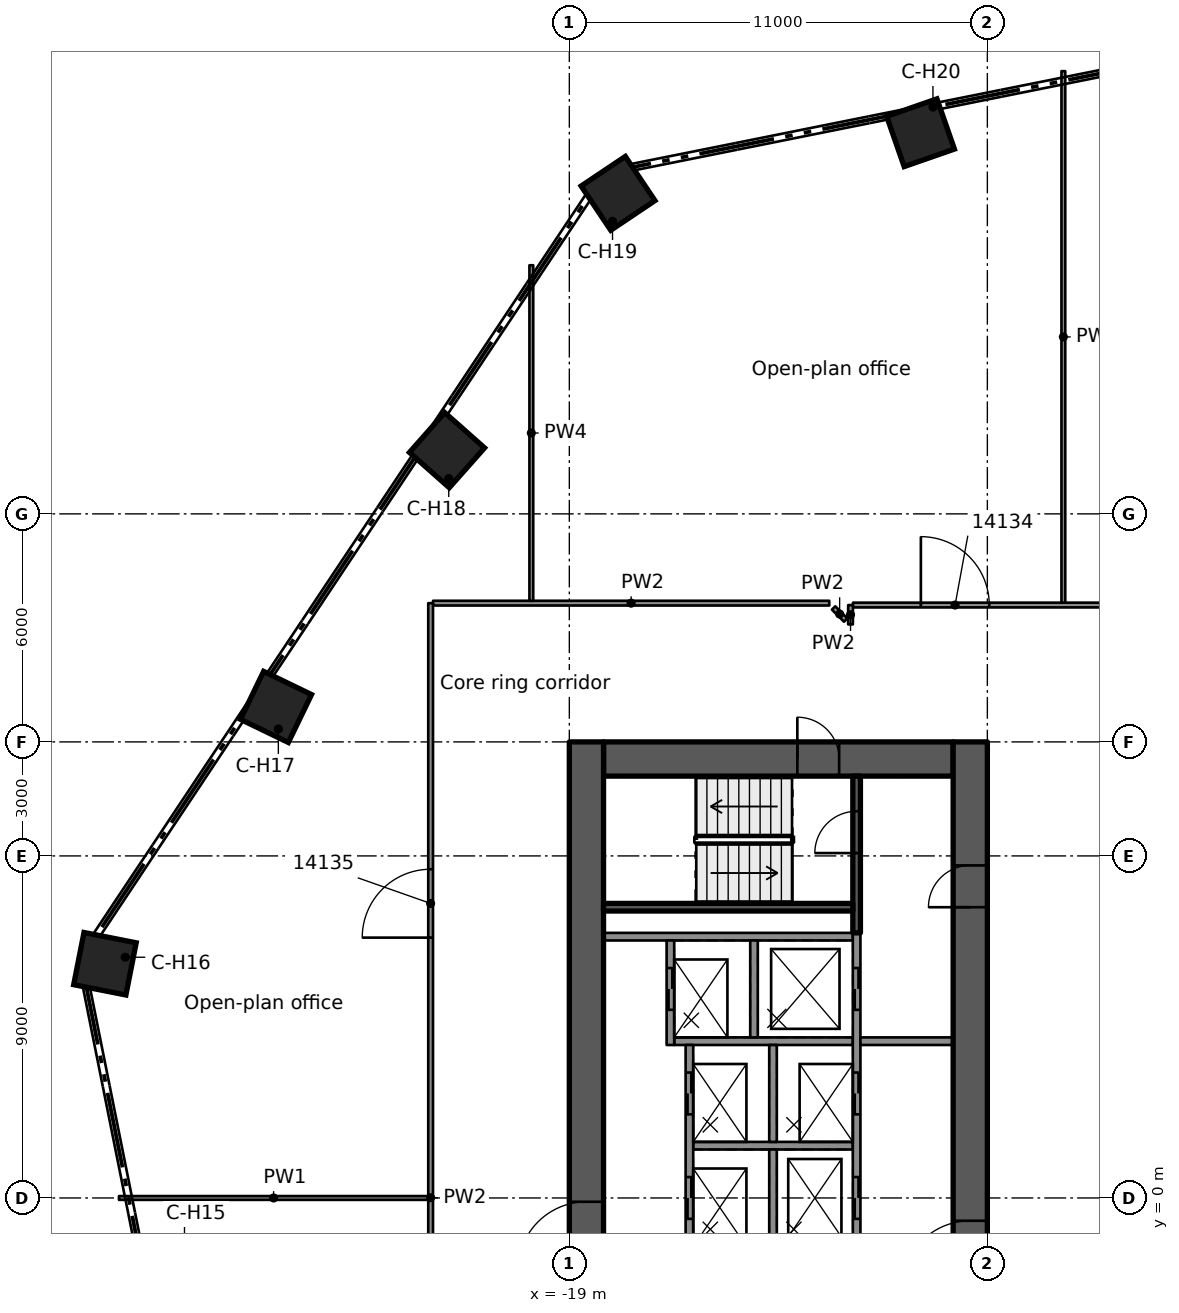
"""IFC4 building model, lengths in metres.
Left out: names, types, materials, properties, quantities, classifications, styles, units other than length and angle.
Written with IfcOpenShell. Run it as: python <this file> out.ifc"""

import sys

from ifc_helpers import new_model, si_unit, direction, frame, frame_2d, origin, origin_2d, place, context, subcontext, project, spatial, rectangle, extrude, element, fill, save


model = new_model("IFC4")
c1 = context("Model", 3, precision=1e-05, world=origin(), true_north=direction((0.0, 1.0)))
c2 = subcontext(c1, "Body", "Model", "MODEL_VIEW")
j1 = project(units=[si_unit("LENGTHUNIT", "METRE"), si_unit("PLANEANGLEUNIT", "RADIAN")], contexts=[c1])
p1 = place(None, origin())
s1 = spatial("IfcSite", under=j1, at=p1, CompositionType="ELEMENT")
p2 = place(p1, origin())
s2 = spatial("IfcBuilding", under=s1, at=p2, CompositionType="ELEMENT")
p3 = place(p2, frame((0.0, 0.0, 69.3)))
s3 = spatial("IfcBuildingStorey", under=s2, at=p3, CompositionType="ELEMENT", Elevation=69.3)
p4 = place(p3, frame((-18.1, 11.55, 0.0), z_axis=(0.0, 0.0, 1.0), x_axis=(1.0, 0.0, 0.0)))
e1 = element("IfcWall", 1, at=p4, inside=s3, PredefinedType="SHEAR", context=c2, shape_type="SweptSolid", body=[
    extrude(rectangle(XDim=9.2, YDim=0.9, at=frame_2d((4.6, 0.0))), origin(), (0.0, 0.0, 1.0), 3.5),
])
p5 = place(p4, frame((5.1, 0.0, 0.0)))
e2 = element("IfcOpeningElement", 2, at=p5, cuts=e1, PredefinedType="OPENING", context=c2, shape_type="SweptSolid", body=[
    extrude(rectangle(XDim=1.1, YDim=2.1, at=frame_2d((0.55, 1.05))), frame((0.0, 0.46, 0.0), z_axis=(0.0, -1.0, 0.0), x_axis=(1.0, 0.0, 0.0)), (0.0, 0.0, 1.0), 0.92),
])
p6 = place(p3, frame((-18.55, -12.0, 0.0), z_axis=(0.0, 0.0, 1.0), x_axis=(0.0, 1.0, 0.0)))
e3 = element("IfcWall", 3, at=p6, inside=s3, PredefinedType="SHEAR", context=c2, shape_type="SweptSolid", body=[
    extrude(rectangle(XDim=24.0, YDim=0.9, at=frame_2d((12.0, 0.0))), origin(), (0.0, 0.0, 1.0), 3.5),
])
p7 = place(p6, frame((10.1, 0.0, 0.0)))
e4 = element("IfcOpeningElement", 4, at=p7, cuts=e3, PredefinedType="OPENING", context=c2, shape_type="SweptSolid", body=[
    extrude(rectangle(XDim=1.8, YDim=2.1, at=frame_2d((0.9, 1.05))), frame((0.0, 0.46, 0.0), z_axis=(0.0, -1.0, 0.0), x_axis=(1.0, 0.0, 0.0)), (0.0, 0.0, 1.0), 0.92),
])
p8 = place(p3, frame((-8.45, -12.0, 0.0), z_axis=(0.0, 0.0, 1.0), x_axis=(0.0, 1.0, 0.0)))
e5 = element("IfcWall", 5, at=p8, inside=s3, PredefinedType="SHEAR", context=c2, shape_type="SweptSolid", body=[
    extrude(rectangle(XDim=24.0, YDim=0.9, at=frame_2d((12.0, 0.0))), origin(), (0.0, 0.0, 1.0), 3.5),
])
p9 = place(p8, frame((9.6, 0.0, 0.0)))
e6 = element("IfcOpeningElement", 6, at=p9, cuts=e5, PredefinedType="OPENING", context=c2, shape_type="SweptSolid", body=[
    extrude(rectangle(XDim=1.8, YDim=2.1, at=frame_2d((0.9, 1.05))), frame((0.0, 0.46, 0.0), z_axis=(0.0, -1.0, 0.0), x_axis=(1.0, 0.0, 0.0)), (0.0, 0.0, 1.0), 0.92),
])
p10 = place(p8, frame((19.65, 0.0, 0.0)))
e7 = element("IfcOpeningElement", 7, at=p10, cuts=e5, PredefinedType="OPENING", context=c2, shape_type="SweptSolid", body=[
    extrude(rectangle(XDim=1.1, YDim=2.1, at=frame_2d((0.55, 1.05))), frame((0.0, 0.46, 0.0), z_axis=(0.0, -1.0, 0.0), x_axis=(1.0, 0.0, 0.0)), (0.0, 0.0, 1.0), 0.92),
])
for number, where, z_axis, x_axis in (
    (8, (-31.22, 6.163, 0.0), (0.0, 0.0, 1.0), (-0.981, 0.194, 0.0)),
    (9, (-26.719, 12.92, 0.0), (0.0, 0.0, 1.0), (-0.9, 0.435, 0.0)),
    (10, (-22.219, 19.677, 0.0), (0.0, 0.0, 1.0), (-0.749, 0.663, 0.0)),
    (11, (-17.718, 26.434, 0.0), (0.0, 0.0, 1.0), (-0.557, 0.831, 0.0)),
    (12, (-9.758, 28.029, 0.0), (0.0, 0.0, 1.0), (-0.329, 0.944, 0.0)),
):
    element("IfcColumn", number, at=place(p3, frame(where, z_axis=z_axis, x_axis=x_axis)), inside=s3, PredefinedType="COLUMN", context=c2, shape_type="SweptSolid", body=[
        extrude(rectangle(XDim=1.4, YDim=1.4, at=origin_2d()), origin(), (0.0, 0.0, 1.0), 3.5),
    ])
p11 = place(p3, frame((-11.54, 6.875, 0.0), z_axis=(0.0, 0.0, 1.0), x_axis=(-1.0, 0.0, 0.0)))
e13 = element("IfcWall", 13, at=p11, inside=s3, PredefinedType="SOLIDWALL", context=c2, shape_type="SweptSolid", body=[
    extrude(rectangle(XDim=6.56, YDim=0.2, at=frame_2d((3.28, 0.0))), origin(), (0.0, 0.0, 1.0), 3.09),
])
p12 = place(p3, frame((-11.54, 1.375, 0.0), z_axis=(0.0, 0.0, 1.0), x_axis=(-1.0, 0.0, 0.0)))
e14 = element("IfcWall", 14, at=p12, inside=s3, PredefinedType="SOLIDWALL", context=c2, shape_type="SweptSolid", body=[
    extrude(rectangle(XDim=4.2, YDim=0.2, at=frame_2d((2.1, 0.0))), origin(), (0.0, 0.0, 1.0), 3.09),
])
p13 = place(p3, frame((-11.54, 4.125, 0.0), z_axis=(0.0, 0.0, 1.0), x_axis=(-1.0, 0.0, 0.0)))
e15 = element("IfcWall", 15, at=p13, inside=s3, PredefinedType="SOLIDWALL", context=c2, shape_type="SweptSolid", body=[
    extrude(rectangle(XDim=4.7, YDim=0.2, at=frame_2d((2.35, 0.0))), origin(), (0.0, 0.0, 1.0), 3.09),
])
p14 = place(p3, frame((-11.44, -6.975, 0.0), z_axis=(0.0, 0.0, 1.0), x_axis=(0.0, 1.0, 0.0)))
e16 = element("IfcWall", 16, at=p14, inside=s3, PredefinedType="SOLIDWALL", context=c2, shape_type="SweptSolid", body=[
    extrude(rectangle(XDim=13.95, YDim=0.2, at=frame_2d((6.975, 0.0))), origin(), (0.0, 0.0, 1.0), 3.09),
])
p15 = place(p14, frame((6.425, 0.0, 0.0)))
e17 = element("IfcOpeningElement", 17, at=p15, cuts=e16, PredefinedType="OPENING", context=c2, shape_type="SweptSolid", body=[
    extrude(rectangle(XDim=1.1, YDim=2.1, at=frame_2d((0.55, 1.05))), frame((0.0, 0.11, 0.0), z_axis=(0.0, -1.0, 0.0), x_axis=(1.0, 0.0, 0.0)), (0.0, 0.0, 1.0), 0.22),
])
p16 = place(p14, frame((9.175, 0.0, 0.0)))
e18 = element("IfcOpeningElement", 18, at=p16, cuts=e16, PredefinedType="OPENING", context=c2, shape_type="SweptSolid", body=[
    extrude(rectangle(XDim=1.1, YDim=2.1, at=frame_2d((0.55, 1.05))), frame((0.0, 0.11, 0.0), z_axis=(0.0, -1.0, 0.0), x_axis=(1.0, 0.0, 0.0)), (0.0, 0.0, 1.0), 0.22),
])
p17 = place(p14, frame((11.925, 0.0, 0.0)))
e19 = element("IfcOpeningElement", 19, at=p17, cuts=e16, PredefinedType="OPENING", context=c2, shape_type="SweptSolid", body=[
    extrude(rectangle(XDim=1.1, YDim=2.1, at=frame_2d((0.55, 1.05))), frame((0.0, 0.11, 0.0), z_axis=(0.0, -1.0, 0.0), x_axis=(1.0, 0.0, 0.0)), (0.0, 0.0, 1.0), 0.22),
])
p18 = place(p14, frame((1.075, 0.0, 0.0)))
e20 = element("IfcOpeningElement", 20, at=p18, cuts=e16, PredefinedType="OPENING", context=c2, shape_type="SweptSolid", body=[
    extrude(rectangle(XDim=0.8, YDim=2.1, at=frame_2d((0.4, 1.05))), frame((0.0, 0.11, 0.0), z_axis=(0.0, -1.0, 0.0), x_axis=(1.0, 0.0, 0.0)), (0.0, 0.0, 1.0), 0.22),
])
for number, where, z_axis, x_axis in (
    (21, (-13.64, -1.275, 0.0), (0.0, 0.0, 1.0), (0.0, 1.0, 0.0)),
    (22, (-13.64, 1.475, 0.0), (0.0, 0.0, 1.0), (0.0, 1.0, 0.0)),
    (23, (-14.14, 4.225, 0.0), (0.0, 0.0, 1.0), (0.0, 1.0, 0.0)),
):
    element("IfcWall", number, at=place(p3, frame(where, z_axis=z_axis, x_axis=x_axis)), inside=s3, PredefinedType="SOLIDWALL", context=c2, shape_type="SweptSolid", body=[
        extrude(rectangle(XDim=2.55, YDim=0.2, at=frame_2d((1.275, 0.0))), origin(), (0.0, 0.0, 1.0), 3.09),
    ])
p19 = place(p3, frame((-15.84, -4.025, 0.0), z_axis=(0.0, 0.0, 1.0), x_axis=(0.0, 1.0, 0.0)))
e24 = element("IfcWall", 24, at=p19, inside=s3, PredefinedType="SOLIDWALL", context=c2, shape_type="SweptSolid", body=[
    extrude(rectangle(XDim=8.05, YDim=0.2, at=frame_2d((4.025, 0.0))), origin(), (0.0, 0.0, 1.0), 3.09),
])
p20 = place(p19, frame((3.475, 0.0, 0.0)))
e25 = element("IfcOpeningElement", 25, at=p20, cuts=e24, PredefinedType="OPENING", context=c2, shape_type="SweptSolid", body=[
    extrude(rectangle(XDim=1.1, YDim=2.1, at=frame_2d((0.55, 1.05))), frame((0.0, 0.11, 0.0), z_axis=(0.0, -1.0, 0.0), x_axis=(1.0, 0.0, 0.0)), (0.0, 0.0, 1.0), 0.22),
])
p21 = place(p19, frame((6.225, 0.0, 0.0)))
e26 = element("IfcOpeningElement", 26, at=p21, cuts=e24, PredefinedType="OPENING", context=c2, shape_type="SweptSolid", body=[
    extrude(rectangle(XDim=1.1, YDim=2.1, at=frame_2d((0.55, 1.05))), frame((0.0, 0.11, 0.0), z_axis=(0.0, -1.0, 0.0), x_axis=(1.0, 0.0, 0.0)), (0.0, 0.0, 1.0), 0.22),
])
p22 = place(p3, frame((-16.34, 4.025, 0.0), z_axis=(0.0, 0.0, 1.0), x_axis=(0.0, 1.0, 0.0)))
e27 = element("IfcWall", 27, at=p22, inside=s3, PredefinedType="SOLIDWALL", context=c2, shape_type="SweptSolid", body=[
    extrude(rectangle(XDim=2.75, YDim=0.2, at=frame_2d((1.375, 0.0))), origin(), (0.0, 0.0, 1.0), 3.09),
])
p23 = place(p22, frame((0.925, 0.0, 0.0)))
e28 = element("IfcOpeningElement", 28, at=p23, cuts=e27, PredefinedType="OPENING", context=c2, shape_type="SweptSolid", body=[
    extrude(rectangle(XDim=1.1, YDim=2.1, at=frame_2d((0.55, 1.05))), frame((0.0, 0.11, 0.0), z_axis=(0.0, -1.0, 0.0), x_axis=(1.0, 0.0, 0.0)), (0.0, 0.0, 1.0), 0.22),
])
p24 = place(p3, frame((-11.44, 6.975, 0.0), z_axis=(0.0, 0.0, 1.0), x_axis=(0.0, 1.0, 0.0)))
e29 = element("IfcWall", 29, at=p24, inside=s3, PredefinedType="SOLIDWALL", context=c2, shape_type="SweptSolid", body=[
    extrude(rectangle(XDim=4.125, YDim=0.2, at=frame_2d((2.062, 0.0))), origin(), (0.0, 0.0, 1.0), 3.09),
])
p25 = place(p24, frame((2.1, 0.0, 0.0)))
e30 = element("IfcOpeningElement", 30, at=p25, cuts=e29, PredefinedType="OPENING", context=c2, shape_type="SweptSolid", body=[
    extrude(rectangle(XDim=1.1, YDim=2.1, at=frame_2d((0.55, 1.05))), frame((0.0, 0.11, 0.0), z_axis=(0.0, -1.0, 0.0), x_axis=(1.0, 0.0, 0.0)), (0.0, 0.0, 1.0), 0.22),
])
p26 = place(p3, frame((-11.54, 7.65, 0.0), z_axis=(0.0, 0.0, 1.0), x_axis=(-1.0, 0.0, 0.0)))
e31 = element("IfcWall", 31, at=p26, inside=s3, PredefinedType="SOLIDWALL", context=c2, shape_type="SweptSolid", body=[
    extrude(rectangle(XDim=6.56, YDim=0.2, at=frame_2d((3.28, 0.0))), origin(), (0.0, 0.0, 1.0), 3.09),
])
p27 = place(p3, frame((-8.9, 4.125, 0.0), z_axis=(0.0, 0.0, 1.0), x_axis=(-1.0, 0.0, 0.0)))
e32 = element("IfcWall", 32, at=p27, inside=s3, PredefinedType="PARTITIONING", context=c2, shape_type="SweptSolid", body=[
    extrude(rectangle(XDim=2.44, YDim=0.2, at=frame_2d((1.22, 0.0))), origin(), (0.0, 0.0, 1.0), 3.09),
])
p28 = place(p3, frame((-12.046, 15.524, 0.0), z_axis=(0.0, 0.0, 1.0), x_axis=(0.707106781187, -0.707106781187, 0.0)))
e33 = element("IfcWall", 33, at=p28, inside=s3, PredefinedType="PARTITIONING", context=c2, shape_type="SweptSolid", body=[
    extrude(rectangle(XDim=0.449, YDim=0.125, at=frame_2d((0.225, 0.0))), origin(), (0.0, 0.0, 1.0), 3.03),
])
p29 = place(p3, frame((-30.851, 0.0, 0.0), z_axis=(0.0, 0.0, 1.0), x_axis=(1.0, 0.0, 0.0)))
e34 = element("IfcWall", 34, at=p29, inside=s3, PredefinedType="PARTITIONING", context=c2, shape_type="SweptSolid", body=[
    extrude(rectangle(XDim=8.139, YDim=0.1, at=frame_2d((4.07, 0.0))), origin(), (0.0, 0.0, 1.0), 3.03),
])
p30 = place(p3, frame((-11.537, 15.601, 0.0), z_axis=(0.0, 0.0, 1.0), x_axis=(1.0, 0.0, 0.0)))
e35 = element("IfcWall", 35, at=p30, inside=s3, PredefinedType="PARTITIONING", context=c2, shape_type="SweptSolid", body=[
    extrude(rectangle(XDim=23.074, YDim=0.125, at=frame_2d((11.537, 0.0))), origin(), (0.0, 0.0, 1.0), 3.03),
])
p31 = place(p30, frame((13.387, 0.0, 0.0)))
e36 = element("IfcOpeningElement", 36, at=p31, cuts=e35, PredefinedType="OPENING", context=c2, shape_type="SweptSolid", body=[
    extrude(rectangle(XDim=1.8, YDim=2.1, at=frame_2d((0.9, 1.05))), frame((0.0, 0.073, 0.0), z_axis=(0.0, -1.0, 0.0), x_axis=(1.0, 0.0, 0.0)), (0.0, 0.0, 1.0), 0.145),
])
p32 = place(p30, frame((1.788, 0.0, 0.0)))
e37 = element("IfcOpeningElement", 37, at=p32, cuts=e35, PredefinedType="OPENING", context=c2, shape_type="SweptSolid", body=[
    extrude(rectangle(XDim=1.8, YDim=2.1, at=frame_2d((0.9, 1.05))), frame((0.0, 0.073, 0.0), z_axis=(0.0, -1.0, 0.0), x_axis=(1.0, 0.0, 0.0)), (0.0, 0.0, 1.0), 0.145),
])
p33 = place(p3, frame((-22.587, 15.651, 0.0), z_axis=(0.0, 0.0, 1.0), x_axis=(1.0, 0.0, 0.0)))
e38 = element("IfcWall", 38, at=p33, inside=s3, PredefinedType="PARTITIONING", context=c2, shape_type="SweptSolid", body=[
    extrude(rectangle(XDim=10.427, YDim=0.125, at=frame_2d((5.213, 0.0))), origin(), (0.0, 0.0, 1.0), 3.03),
])
p34 = place(p3, frame((-11.601, 15.092, 0.0), z_axis=(0.0, 0.0, 1.0), x_axis=(0.00192214926, 0.999998152669, 0.0)))
e39 = element("IfcWall", 39, at=p34, inside=s3, PredefinedType="PARTITIONING", context=c2, shape_type="SweptSolid", body=[
    extrude(rectangle(XDim=0.508, YDim=0.125, at=frame_2d((0.254, 0.0))), origin(), (0.0, 0.0, 1.0), 3.03),
])
p35 = place(p3, frame((-6.0, 15.664, 0.0), z_axis=(0.0, 0.0, 1.0), x_axis=(0.0, 1.0, 0.0)))
e40 = element("IfcWall", 40, at=p35, inside=s3, PredefinedType="PARTITIONING", context=c2, shape_type="SweptSolid", body=[
    extrude(rectangle(XDim=13.985, YDim=0.1, at=frame_2d((6.992, 0.0))), origin(), (0.0, 0.0, 1.0), 3.03),
])
p36 = place(p3, frame((-20.0, 15.713, 0.0), z_axis=(0.0, 0.0, 1.0), x_axis=(0.0, 1.0, 0.0)))
e41 = element("IfcWall", 41, at=p36, inside=s3, PredefinedType="PARTITIONING", context=c2, shape_type="SweptSolid", body=[
    extrude(rectangle(XDim=8.829, YDim=0.1, at=frame_2d((4.415, 0.0))), origin(), (0.0, 0.0, 1.0), 2.419),
])
p37 = place(p3, frame((-22.65, -15.639, 0.0), z_axis=(0.0, 0.0, 1.0), x_axis=(0.0, 1.0, 0.0)))
e42 = element("IfcWall", 42, at=p37, inside=s3, PredefinedType="PARTITIONING", context=c2, shape_type="SweptSolid", body=[
    extrude(rectangle(XDim=31.29, YDim=0.125, at=frame_2d((15.645, 0.0))), origin(), (0.0, 0.0, 1.0), 3.03),
])
p38 = place(p37, frame((6.85, 0.0, 0.0)))
e43 = element("IfcOpeningElement", 43, at=p38, cuts=e42, PredefinedType="OPENING", context=c2, shape_type="SweptSolid", body=[
    extrude(rectangle(XDim=1.8, YDim=2.1, at=frame_2d((0.9, 1.05))), frame((0.0, 0.073, 0.0), z_axis=(0.0, -1.0, 0.0), x_axis=(1.0, 0.0, 0.0)), (0.0, 0.0, 1.0), 0.145),
])
p39 = place(p37, frame((22.489, 0.0, 0.0)))
e44 = element("IfcOpeningElement", 44, at=p39, cuts=e42, PredefinedType="OPENING", context=c2, shape_type="SweptSolid", body=[
    extrude(rectangle(XDim=1.8, YDim=2.1, at=frame_2d((0.9, 1.05))), frame((0.0, 0.073, 0.0), z_axis=(0.0, -1.0, 0.0), x_axis=(1.0, 0.0, 0.0)), (0.0, 0.0, 1.0), 0.145),
])
p40 = place(p15, origin())
e45 = element("IfcDoor", 45, at=p40, inside=s3, OperationType="DOUBLE_DOOR_SLIDING", PredefinedType="DOOR", context=c2, shape_type="SweptSolid", body=[
    extrude(rectangle(XDim=1.1, YDim=2.1, at=frame_2d((0.55, 1.05))), frame((0.0, 0.025, 0.0), z_axis=(0.0, -1.0, 0.0), x_axis=(1.0, 0.0, 0.0)), (0.0, 0.0, 1.0), 0.05),
])
fill(e17, e45)
p41 = place(p20, origin())
e46 = element("IfcDoor", 46, at=p41, inside=s3, OperationType="DOUBLE_DOOR_SLIDING", PredefinedType="DOOR", context=c2, shape_type="SweptSolid", body=[
    extrude(rectangle(XDim=1.1, YDim=2.1, at=frame_2d((0.55, 1.05))), frame((0.0, 0.025, 0.0), z_axis=(0.0, -1.0, 0.0), x_axis=(1.0, 0.0, 0.0)), (0.0, 0.0, 1.0), 0.05),
])
fill(e25, e46)
p42 = place(p16, origin())
e47 = element("IfcDoor", 47, at=p42, inside=s3, OperationType="DOUBLE_DOOR_SLIDING", PredefinedType="DOOR", context=c2, shape_type="SweptSolid", body=[
    extrude(rectangle(XDim=1.1, YDim=2.1, at=frame_2d((0.55, 1.05))), frame((0.0, 0.025, 0.0), z_axis=(0.0, -1.0, 0.0), x_axis=(1.0, 0.0, 0.0)), (0.0, 0.0, 1.0), 0.05),
])
fill(e18, e47)
p43 = place(p21, origin())
e48 = element("IfcDoor", 48, at=p43, inside=s3, OperationType="DOUBLE_DOOR_SLIDING", PredefinedType="DOOR", context=c2, shape_type="SweptSolid", body=[
    extrude(rectangle(XDim=1.1, YDim=2.1, at=frame_2d((0.55, 1.05))), frame((0.0, 0.025, 0.0), z_axis=(0.0, -1.0, 0.0), x_axis=(1.0, 0.0, 0.0)), (0.0, 0.0, 1.0), 0.05),
])
fill(e26, e48)
p44 = place(p17, origin())
e49 = element("IfcDoor", 49, at=p44, inside=s3, OperationType="DOUBLE_DOOR_SLIDING", PredefinedType="DOOR", context=c2, shape_type="SweptSolid", body=[
    extrude(rectangle(XDim=1.1, YDim=2.1, at=frame_2d((0.55, 1.05))), frame((0.0, 0.025, 0.0), z_axis=(0.0, -1.0, 0.0), x_axis=(1.0, 0.0, 0.0)), (0.0, 0.0, 1.0), 0.05),
])
fill(e19, e49)
p45 = place(p23, origin())
e50 = element("IfcDoor", 50, at=p45, inside=s3, OperationType="DOUBLE_DOOR_SLIDING", PredefinedType="DOOR", context=c2, shape_type="SweptSolid", body=[
    extrude(rectangle(XDim=1.1, YDim=2.1, at=frame_2d((0.55, 1.05))), frame((0.0, 0.025, 0.0), z_axis=(0.0, -1.0, 0.0), x_axis=(1.0, 0.0, 0.0)), (0.0, 0.0, 1.0), 0.05),
])
fill(e28, e50)
p46 = place(p9, origin())
e51 = element("IfcDoor", 51, at=p46, inside=s3, OperationType="SINGLE_SWING_LEFT", PredefinedType="DOOR", context=c2, shape_type="SweptSolid", body=[
    extrude(rectangle(XDim=1.8, YDim=2.1, at=frame_2d((0.9, 1.05))), frame((0.0, 0.025, 0.0), z_axis=(0.0, -1.0, 0.0), x_axis=(1.0, 0.0, 0.0)), (0.0, 0.0, 1.0), 0.05),
])
fill(e6, e51)
p47 = place(p7, origin())
e52 = element("IfcDoor", 52, at=p47, inside=s3, OperationType="SINGLE_SWING_LEFT", PredefinedType="DOOR", context=c2, shape_type="SweptSolid", body=[
    extrude(rectangle(XDim=1.8, YDim=2.1, at=frame_2d((0.9, 1.05))), frame((0.0, 0.025, 0.0), z_axis=(0.0, -1.0, 0.0), x_axis=(1.0, 0.0, 0.0)), (0.0, 0.0, 1.0), 0.05),
])
fill(e4, e52)
p48 = place(p10, origin())
e53 = element("IfcDoor", 53, at=p48, inside=s3, OperationType="SINGLE_SWING_RIGHT", PredefinedType="DOOR", context=c2, shape_type="SweptSolid", body=[
    extrude(rectangle(XDim=1.1, YDim=2.1, at=frame_2d((0.55, 1.05))), frame((0.0, 0.025, 0.0), z_axis=(0.0, -1.0, 0.0), x_axis=(1.0, 0.0, 0.0)), (0.0, 0.0, 1.0), 0.05),
])
fill(e7, e53)
p49 = place(p5, origin())
e54 = element("IfcDoor", 54, at=p49, inside=s3, OperationType="SINGLE_SWING_RIGHT", PredefinedType="DOOR", context=c2, shape_type="SweptSolid", body=[
    extrude(rectangle(XDim=1.1, YDim=2.1, at=frame_2d((0.55, 1.05))), frame((0.0, 0.025, 0.0), z_axis=(0.0, -1.0, 0.0), x_axis=(1.0, 0.0, 0.0)), (0.0, 0.0, 1.0), 0.05),
])
fill(e2, e54)
p50 = place(p25, origin())
e55 = element("IfcDoor", 55, at=p50, inside=s3, OperationType="SINGLE_SWING_RIGHT", PredefinedType="DOOR", context=c2, shape_type="SweptSolid", body=[
    extrude(rectangle(XDim=1.1, YDim=2.1, at=frame_2d((0.55, 1.05))), frame((0.0, 0.025, 0.0), z_axis=(0.0, -1.0, 0.0), x_axis=(1.0, 0.0, 0.0)), (0.0, 0.0, 1.0), 0.05),
])
fill(e30, e55)
p51 = place(p32, origin())
e56 = element("IfcDoor", 56, at=p51, inside=s3, OperationType="DOUBLE_DOOR_SINGLE_SWING", PredefinedType="DOOR", context=c2, shape_type="SweptSolid", body=[
    extrude(rectangle(XDim=1.8, YDim=2.1, at=frame_2d((0.9, 1.05))), frame((0.0, 0.025, 0.0), z_axis=(0.0, -1.0, 0.0), x_axis=(1.0, 0.0, 0.0)), (0.0, 0.0, 1.0), 0.05),
])
fill(e37, e56)
p52 = place(p39, origin())
e57 = element("IfcDoor", 57, at=p52, inside=s3, OperationType="DOUBLE_DOOR_SINGLE_SWING", PredefinedType="DOOR", context=c2, shape_type="SweptSolid", body=[
    extrude(rectangle(XDim=1.8, YDim=2.1, at=frame_2d((0.9, 1.05))), frame((0.0, 0.025, 0.0), z_axis=(0.0, -1.0, 0.0), x_axis=(1.0, 0.0, 0.0)), (0.0, 0.0, 1.0), 0.05),
])
fill(e44, e57)
save(model, sys.argv[1])
